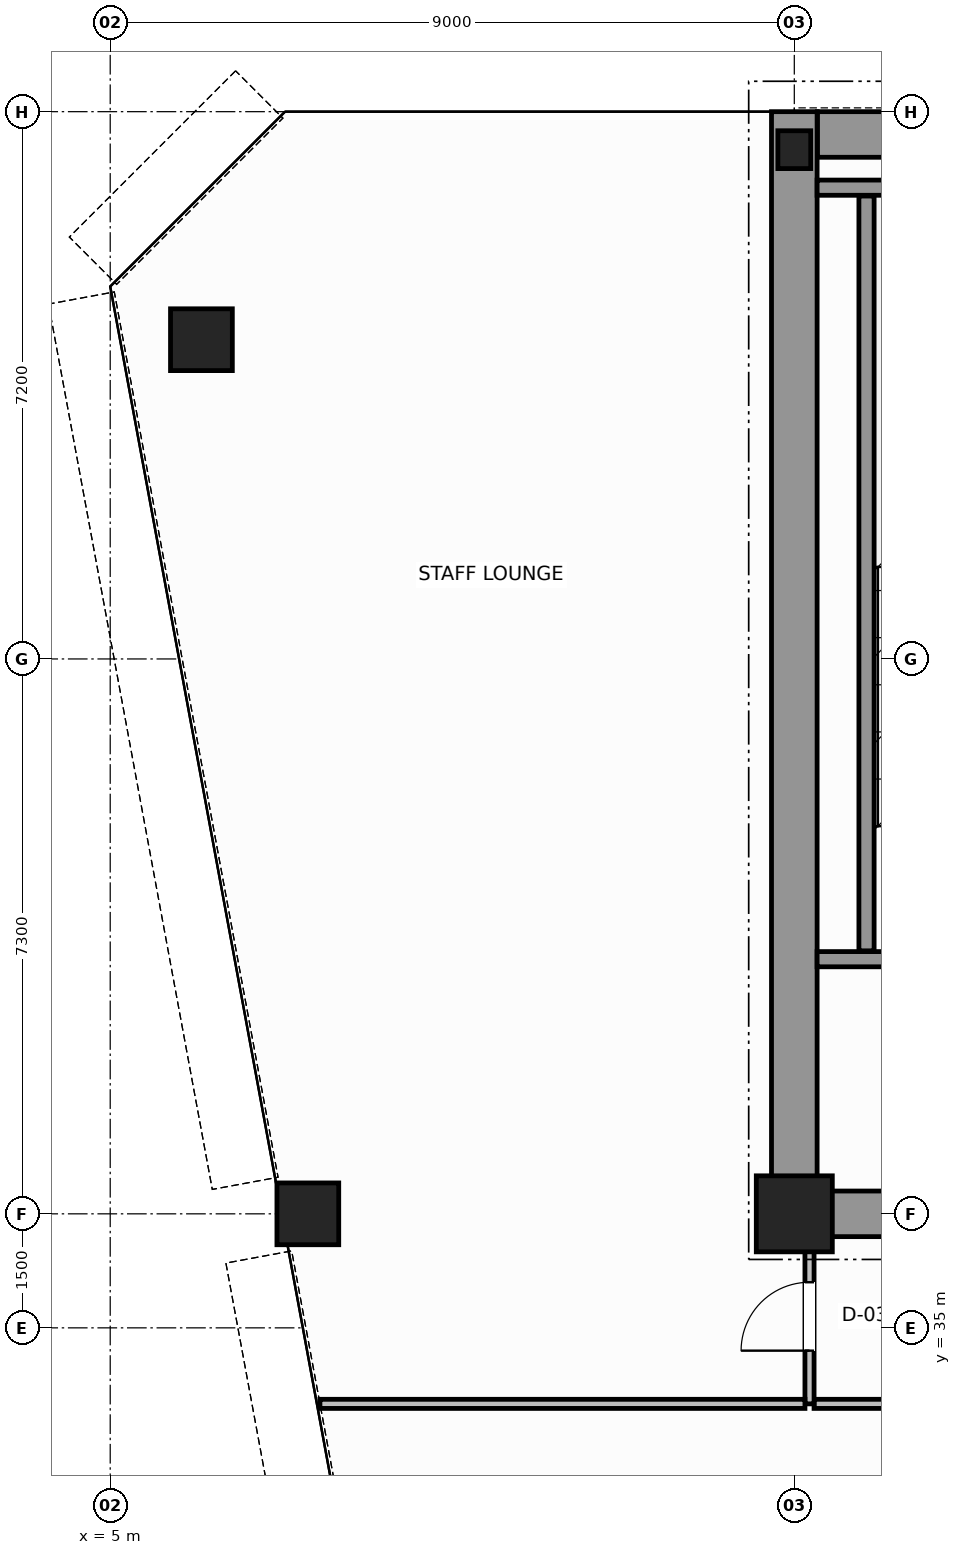
"""IFC4 building model, lengths in metres.
Left out: names, types, materials, properties, quantities, classifications, styles, units other than length and angle.
Written with IfcOpenShell. Run it as: python <this file> out.ifc"""

import sys

from ifc_helpers import new_model, si_unit, direction, frame, frame_2d, origin, origin_2d, place, context, subcontext, project, spatial, rectangle, hollow_circle, i_section, extrude, source, transform, mapped, element, fill, save


model = new_model("IFC4")
c1 = context("Model", 3, precision=1e-05, world=origin(), true_north=direction((0.0, 1.0)))
c2 = subcontext(c1, "Body", "Model", "MODEL_VIEW")
j1 = project(units=[si_unit("LENGTHUNIT", "METRE"), si_unit("PLANEANGLEUNIT", "RADIAN")], contexts=[c1])
p1 = place(None, origin())
s1 = spatial("IfcSite", under=j1, at=p1, CompositionType="ELEMENT")
p2 = place(p1, origin())
s2 = spatial("IfcBuilding", under=s1, at=p2, CompositionType="ELEMENT")
p3 = place(p2, frame((0.0, 0.0, 207.0)))
s3 = spatial("IfcBuildingStorey", under=s2, at=p3, CompositionType="ELEMENT", Elevation=207.0)
m1 = source(origin(), c2, "Body", "SweptSolid", [
    extrude(rectangle(XDim=1.0, YDim=1.0, at=origin_2d()), origin(), (0.0, 0.0, 1.0), 3.8),
])
p4 = place(p3, frame((14.0, 36.5, 0.0), z_axis=(0.0, 0.0, 1.0), x_axis=(1.0, 0.0, 0.0)))
e1 = element("IfcColumn", 1, at=p4, inside=s3, PredefinedType="COLUMN", context=c2, shape_type="MappedRepresentation", body=[
    mapped(m1, transform((0.0, 0.0, 0.0), scale=1.0)),
])
m2 = source(origin(), c2, "Body", "SweptSolid", [
    extrude(i_section(OverallWidth=0.432, OverallDepth=0.498, WebThickness=0.055, FlangeThickness=0.068, FilletRadius=0.015, at=origin_2d()), origin(), (0.0, 0.0, 1.0), 3.8),
])
p5 = place(p3, frame((14.0, 50.5, 0.0), z_axis=(0.0, 0.0, 1.0), x_axis=(1.0, 0.0, 0.0)))
e2 = element("IfcColumn", 2, at=p5, inside=s3, PredefinedType="COLUMN", context=c2, shape_type="MappedRepresentation", body=[
    mapped(m2, transform((0.0, 0.0, 0.0), scale=1.0)),
])
m3 = source(origin(), c2, "Body", "SweptSolid", [
    extrude(hollow_circle(Radius=0.406, WallThickness=0.04, at=origin_2d()), origin(), (0.0, 0.0, 1.0), 3.8),
])
for number, where, z_axis, x_axis in (
    (3, (6.2, 48.0, 0.0), (0.0, 0.0, 1.0), (1.0, 0.0, 0.0)),
    (4, (7.6, 36.5, 0.0), (0.0, 0.0, 1.0), (1.0, 0.0, 0.0)),
):
    element("IfcColumn", number, at=place(p3, frame(where, z_axis=z_axis, x_axis=x_axis)), inside=s3, PredefinedType="COLUMN", context=c2, shape_type="MappedRepresentation", body=[
        mapped(m3, transform((0.0, 0.0, 0.0), scale=1.0)),
    ])
p6 = place(p3, frame((14.304, 50.7, 0.0), z_axis=(0.0, 0.0, 1.0), x_axis=(1.0, 0.0, 0.0)))
e5 = element("IfcWall", 5, at=p6, inside=s3, PredefinedType="SHEAR", context=c2, shape_type="SweptSolid", body=[
    extrude(rectangle(XDim=19.694, YDim=0.6, at=frame_2d((9.847, 0.0))), origin(), (0.0, 0.0, 1.0), 3.8),
])
p7 = place(p3, frame((14.0, 36.5, 0.0), z_axis=(0.0, 0.0, 1.0), x_axis=(0.0, 1.0, 0.0)))
e6 = element("IfcWall", 6, at=p7, inside=s3, PredefinedType="SHEAR", context=c2, shape_type="SweptSolid", body=[
    extrude(rectangle(XDim=14.5, YDim=0.6, at=frame_2d((7.25, 0.0))), origin(), (0.0, 0.0, 1.0), 3.8),
])
p8 = place(p3, frame((14.32, 36.5, 0.0), z_axis=(0.0, 0.0, 1.0), x_axis=(1.0, 0.0, 0.0)))
e7 = element("IfcWall", 7, at=p8, inside=s3, PredefinedType="SHEAR", context=c2, shape_type="SweptSolid", body=[
    extrude(rectangle(XDim=3.88, YDim=0.6, at=frame_2d((1.94, 0.0))), origin(), (0.0, 0.0, 1.0), 2.58),
])
p9 = place(p3, frame((14.3, 39.85, 0.0), z_axis=(0.0, 0.0, 1.0), x_axis=(1.0, 0.0, 0.0)))
e8 = element("IfcWall", 8, at=p9, inside=s3, PredefinedType="SOLIDWALL", context=c2, shape_type="SweptSolid", body=[
    extrude(rectangle(XDim=4.3, YDim=0.2, at=frame_2d((2.15, 0.0))), origin(), (0.0, 0.0, 1.0), 3.8),
])
p10 = place(p9, frame((1.875, 0.0, 0.0)))
e9 = element("IfcOpeningElement", 9, at=p10, cuts=e8, PredefinedType="OPENING", context=c2, shape_type="SweptSolid", body=[
    extrude(rectangle(XDim=1.1, YDim=2.15, at=frame_2d((0.55, 1.075))), frame((0.0, 0.11, 0.0), z_axis=(0.0, -1.0, 0.0), x_axis=(1.0, 0.0, 0.0)), (0.0, 0.0, 1.0), 0.22),
])
p11 = place(p3, frame((14.3, 50.0, 0.0), z_axis=(0.0, 0.0, 1.0), x_axis=(1.0, 0.0, 0.0)))
e10 = element("IfcWall", 10, at=p11, inside=s3, PredefinedType="SOLIDWALL", context=c2, shape_type="SweptSolid", body=[
    extrude(rectangle(XDim=4.3, YDim=0.2, at=frame_2d((2.15, 0.0))), origin(), (0.0, 0.0, 1.0), 3.8),
])
p12 = place(p3, frame((14.95, 39.96, 0.0), z_axis=(0.0, 0.0, 1.0), x_axis=(0.0, 1.0, 0.0)))
e11 = element("IfcWall", 11, at=p12, inside=s3, PredefinedType="SOLIDWALL", context=c2, shape_type="SweptSolid", body=[
    extrude(rectangle(XDim=9.93, YDim=0.2, at=frame_2d((4.965, 0.0))), origin(), (0.0, 0.0, 1.0), 3.8),
])
p13 = place(p3, frame((14.26, 34.0, 0.0), z_axis=(0.0, 0.0, 1.0), x_axis=(1.0, 0.0, 0.0)))
e12 = element("IfcWall", 12, at=p13, inside=s3, PredefinedType="PARTITIONING", context=c2, shape_type="SweptSolid", body=[
    extrude(rectangle(XDim=20.88, YDim=0.12, at=frame_2d((10.44, 0.0))), origin(), (0.0, 0.0, 1.0), 3.58),
])
p14 = place(p3, frame((14.2, 34.0, 0.0), z_axis=(0.0, 0.0, 1.0), x_axis=(0.0, 1.0, 0.0)))
e13 = element("IfcWall", 13, at=p14, inside=s3, PredefinedType="PARTITIONING", context=c2, shape_type="SweptSolid", body=[
    extrude(rectangle(XDim=2.44, YDim=0.12, at=frame_2d((1.22, 0.0))), origin(), (0.0, 0.0, 1.0), 3.58),
])
p15 = place(p14, frame((0.7, 0.0, 0.0)))
e14 = element("IfcOpeningElement", 14, at=p15, cuts=e13, PredefinedType="OPENING", context=c2, shape_type="SweptSolid", body=[
    extrude(rectangle(XDim=0.9, YDim=2.15, at=frame_2d((0.45, 1.075))), frame((0.0, 0.07, 0.0), z_axis=(0.0, -1.0, 0.0), x_axis=(1.0, 0.0, 0.0)), (0.0, 0.0, 1.0), 0.14),
])
p16 = place(p3, frame((7.759, 34.0, 0.0), z_axis=(0.0, 0.0, 1.0), x_axis=(1.0, 0.0, 0.0)))
e15 = element("IfcWall", 15, at=p16, inside=s3, PredefinedType="PARTITIONING", context=c2, shape_type="SweptSolid", body=[
    extrude(rectangle(XDim=6.381, YDim=0.12, at=frame_2d((3.19, 0.0))), origin(), (0.0, 0.0, 1.0), 3.58),
])
m4 = source(origin(), c2, "Body", "SweptSolid", [
    extrude(rectangle(XDim=0.9, YDim=2.15, at=frame_2d((0.45, 1.075))), frame((0.0, 0.025, 0.0), z_axis=(0.0, -1.0, 0.0), x_axis=(1.0, 0.0, 0.0)), (0.0, 0.0, 1.0), 0.05),
])
p17 = place(p15, origin())
e16 = element("IfcDoor", 16, at=p17, inside=s3, OperationType="SINGLE_SWING_LEFT", PredefinedType="DOOR", context=c2, shape_type="MappedRepresentation", body=[
    mapped(m4, transform((0.0, 0.0, 0.0), scale=1.0)),
])
fill(e14, e16)
save(model, sys.argv[1])
